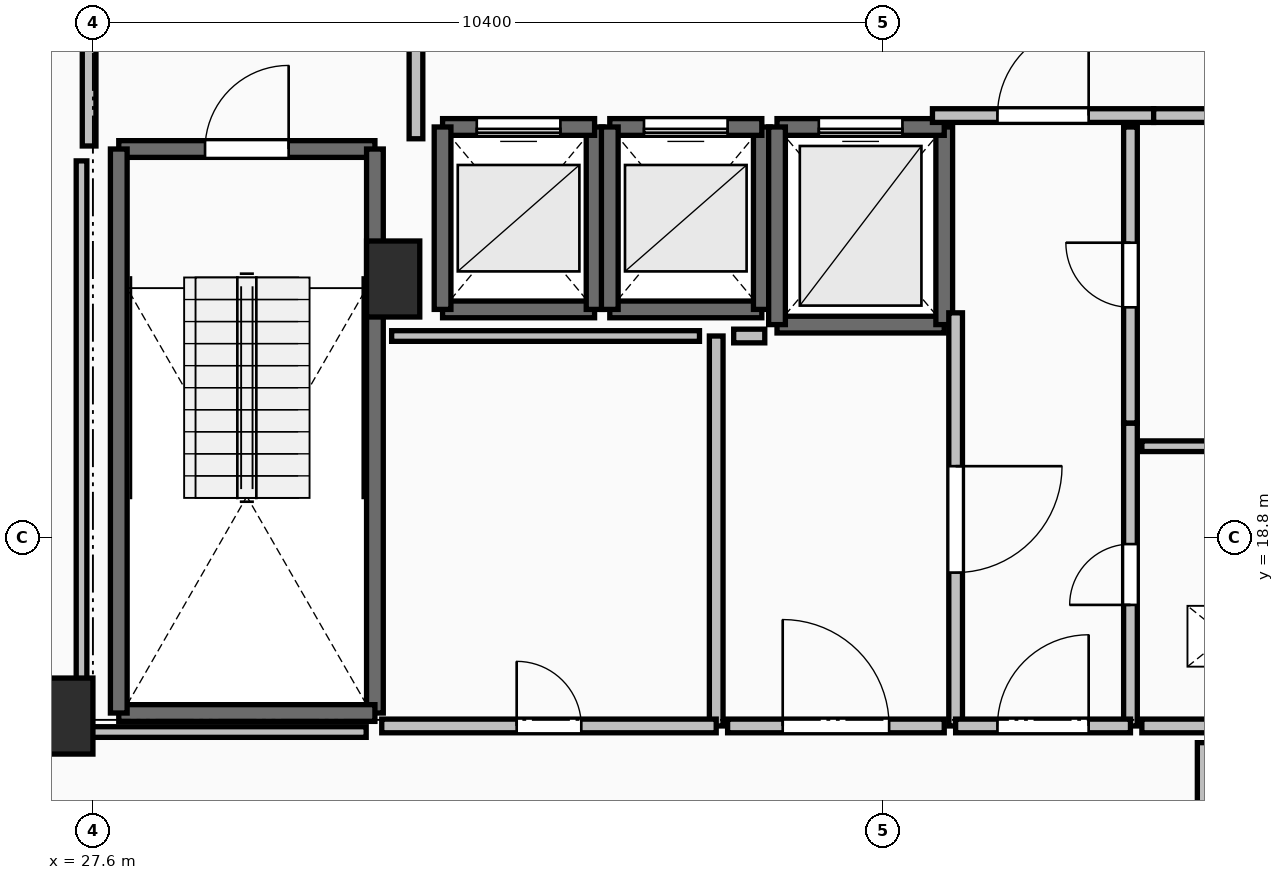
"""IFC4 building model, lengths in metres.
Left out: names, types, materials, properties, quantities, classifications, styles, units other than length and angle.
Written with IfcOpenShell. Run it as: python <this file> out.ifc"""

import sys

from ifc_helpers import new_model, si_unit, direction, frame, frame_2d, origin, origin_2d, place, context, subcontext, project, spatial, rectangle, extrude, element, fill, save


model = new_model("IFC4")
c1 = context("Model", 3, precision=1e-05, world=origin(), true_north=direction((0.0, 1.0)))
c2 = subcontext(c1, "Body", "Model", "MODEL_VIEW")
j1 = project(units=[si_unit("LENGTHUNIT", "METRE"), si_unit("PLANEANGLEUNIT", "RADIAN")], contexts=[c1])
p1 = place(None, origin())
s1 = spatial("IfcSite", under=j1, at=p1, CompositionType="ELEMENT")
p2 = place(p1, origin())
s2 = spatial("IfcBuilding", under=s1, at=p2, CompositionType="ELEMENT")
p3 = place(p2, frame((0.0, 0.0, 221.4)))
s3 = spatial("IfcBuildingStorey", under=s2, at=p3, CompositionType="ELEMENT", Elevation=221.4)
for number, where, z_axis, x_axis in (
    (1, (27.25, 16.45, 0.0), (0.0, 0.0, 1.0), (1.0, 0.0, 0.0)),
    (2, (31.55, 22.2, 0.0), (0.0, 0.0, 1.0), (1.0, 0.0, 0.0)),
):
    element("IfcColumn", number, at=place(p3, frame(where, z_axis=z_axis, x_axis=x_axis)), inside=s3, PredefinedType="PILASTER", context=c2, shape_type="SweptSolid", body=[
        extrude(rectangle(XDim=0.7, YDim=1.0, at=origin_2d()), origin(), (0.0, 0.0, 1.0), 3.55),
    ])
p4 = place(p3, frame((27.94, 23.91, 0.0), z_axis=(0.0, 0.0, 1.0), x_axis=(1.0, 0.0, 0.0)))
e3 = element("IfcWall", 3, at=p4, inside=s3, PredefinedType="SOLIDWALL", context=c2, shape_type="SweptSolid", body=[
    extrude(rectangle(XDim=3.37, YDim=0.22, at=frame_2d((1.685, 0.0))), origin(), (0.0, 0.0, 1.0), 3.2),
])
p5 = place(p4, frame((1.135, 0.0, 0.0)))
e4 = element("IfcOpeningElement", 4, at=p5, cuts=e3, PredefinedType="OPENING", context=c2, shape_type="SweptSolid", body=[
    extrude(rectangle(XDim=1.1, YDim=2.15, at=frame_2d((0.55, 1.075))), frame((0.0, 0.125, 0.0), z_axis=(0.0, -1.0, 0.0), x_axis=(1.0, 0.0, 0.0)), (0.0, 0.0, 1.0), 0.25),
])
p6 = place(p3, frame((31.31, 23.91, 0.0), z_axis=(0.0, 0.0, 1.0), x_axis=(0.0, -1.0, 0.0)))
e5 = element("IfcWall", 5, at=p6, inside=s3, PredefinedType="SOLIDWALL", context=c2, shape_type="SweptSolid", body=[
    extrude(rectangle(XDim=7.42, YDim=0.22, at=frame_2d((3.71, 0.0))), origin(), (0.0, 0.0, 1.0), 3.2),
])
p7 = place(p3, frame((31.31, 16.49, 0.0), z_axis=(0.0, 0.0, 1.0), x_axis=(-1.0, 0.0, 0.0)))
e6 = element("IfcWall", 6, at=p7, inside=s3, PredefinedType="SOLIDWALL", context=c2, shape_type="SweptSolid", body=[
    extrude(rectangle(XDim=3.37, YDim=0.22, at=frame_2d((1.685, 0.0))), origin(), (0.0, 0.0, 1.0), 3.2),
])
p8 = place(p3, frame((27.94, 16.49, 0.0), z_axis=(0.0, 0.0, 1.0), x_axis=(0.0, 1.0, 0.0)))
e7 = element("IfcWall", 7, at=p8, inside=s3, PredefinedType="SOLIDWALL", context=c2, shape_type="SweptSolid", body=[
    extrude(rectangle(XDim=7.42, YDim=0.22, at=frame_2d((3.71, 0.0))), origin(), (0.0, 0.0, 1.0), 3.2),
])
p9 = place(p3, frame((32.2, 21.8, 0.0), z_axis=(0.0, 0.0, 1.0), x_axis=(1.0, 0.0, 0.0)))
e8 = element("IfcWall", 8, at=p9, inside=s3, PredefinedType="SOLIDWALL", context=c2, shape_type="SweptSolid", body=[
    extrude(rectangle(XDim=2.0, YDim=0.22, at=frame_2d((1.0, 0.0))), origin(), (0.0, 0.0, 1.0), 3.2),
])
p10 = place(p3, frame((34.2, 21.8, 0.0), z_axis=(0.0, 0.0, 1.0), x_axis=(0.0, 1.0, 0.0)))
e9 = element("IfcWall", 9, at=p10, inside=s3, PredefinedType="SOLIDWALL", context=c2, shape_type="SweptSolid", body=[
    extrude(rectangle(XDim=2.4, YDim=0.22, at=frame_2d((1.2, 0.0))), origin(), (0.0, 0.0, 1.0), 3.2),
])
p11 = place(p3, frame((34.2, 24.2, 0.0), z_axis=(0.0, 0.0, 1.0), x_axis=(-1.0, 0.0, 0.0)))
e10 = element("IfcWall", 10, at=p11, inside=s3, PredefinedType="SOLIDWALL", context=c2, shape_type="SweptSolid", body=[
    extrude(rectangle(XDim=2.0, YDim=0.22, at=frame_2d((1.0, 0.0))), origin(), (0.0, 0.0, 1.0), 3.2),
])
p12 = place(p11, frame((0.45, 0.0, 0.0)))
e11 = element("IfcOpeningElement", 11, at=p12, cuts=e10, PredefinedType="OPENING", context=c2, shape_type="SweptSolid", body=[
    extrude(rectangle(XDim=1.1, YDim=2.2, at=frame_2d((0.55, 1.1))), frame((0.0, 0.125, 0.0), z_axis=(0.0, -1.0, 0.0), x_axis=(1.0, 0.0, 0.0)), (0.0, 0.0, 1.0), 0.25),
])
p13 = place(p3, frame((32.2, 24.2, 0.0), z_axis=(0.0, 0.0, 1.0), x_axis=(0.0, -1.0, 0.0)))
e12 = element("IfcWall", 12, at=p13, inside=s3, PredefinedType="SOLIDWALL", context=c2, shape_type="SweptSolid", body=[
    extrude(rectangle(XDim=2.4, YDim=0.22, at=frame_2d((1.2, 0.0))), origin(), (0.0, 0.0, 1.0), 3.2),
])
p14 = place(p3, frame((34.4, 21.8, 0.0), z_axis=(0.0, 0.0, 1.0), x_axis=(1.0, 0.0, 0.0)))
e13 = element("IfcWall", 13, at=p14, inside=s3, PredefinedType="SOLIDWALL", context=c2, shape_type="SweptSolid", body=[
    extrude(rectangle(XDim=2.0, YDim=0.22, at=frame_2d((1.0, 0.0))), origin(), (0.0, 0.0, 1.0), 3.2),
])
p15 = place(p3, frame((36.4, 21.8, 0.0), z_axis=(0.0, 0.0, 1.0), x_axis=(0.0, 1.0, 0.0)))
e14 = element("IfcWall", 14, at=p15, inside=s3, PredefinedType="SOLIDWALL", context=c2, shape_type="SweptSolid", body=[
    extrude(rectangle(XDim=2.4, YDim=0.22, at=frame_2d((1.2, 0.0))), origin(), (0.0, 0.0, 1.0), 3.2),
])
p16 = place(p3, frame((36.4, 24.2, 0.0), z_axis=(0.0, 0.0, 1.0), x_axis=(-1.0, 0.0, 0.0)))
e15 = element("IfcWall", 15, at=p16, inside=s3, PredefinedType="SOLIDWALL", context=c2, shape_type="SweptSolid", body=[
    extrude(rectangle(XDim=2.0, YDim=0.22, at=frame_2d((1.0, 0.0))), origin(), (0.0, 0.0, 1.0), 3.2),
])
p17 = place(p16, frame((0.45, 0.0, 0.0)))
e16 = element("IfcOpeningElement", 16, at=p17, cuts=e15, PredefinedType="OPENING", context=c2, shape_type="SweptSolid", body=[
    extrude(rectangle(XDim=1.1, YDim=2.2, at=frame_2d((0.55, 1.1))), frame((0.0, 0.125, 0.0), z_axis=(0.0, -1.0, 0.0), x_axis=(1.0, 0.0, 0.0)), (0.0, 0.0, 1.0), 0.25),
])
p18 = place(p3, frame((34.4, 24.2, 0.0), z_axis=(0.0, 0.0, 1.0), x_axis=(0.0, -1.0, 0.0)))
e17 = element("IfcWall", 17, at=p18, inside=s3, PredefinedType="SOLIDWALL", context=c2, shape_type="SweptSolid", body=[
    extrude(rectangle(XDim=2.4, YDim=0.22, at=frame_2d((1.2, 0.0))), origin(), (0.0, 0.0, 1.0), 3.2),
])
p19 = place(p3, frame((36.6, 21.6, 0.0), z_axis=(0.0, 0.0, 1.0), x_axis=(1.0, 0.0, 0.0)))
e18 = element("IfcWall", 18, at=p19, inside=s3, PredefinedType="SOLIDWALL", context=c2, shape_type="SweptSolid", body=[
    extrude(rectangle(XDim=2.2, YDim=0.22, at=frame_2d((1.1, 0.0))), origin(), (0.0, 0.0, 1.0), 3.2),
])
p20 = place(p3, frame((38.8, 21.6, 0.0), z_axis=(0.0, 0.0, 1.0), x_axis=(0.0, 1.0, 0.0)))
e19 = element("IfcWall", 19, at=p20, inside=s3, PredefinedType="SOLIDWALL", context=c2, shape_type="SweptSolid", body=[
    extrude(rectangle(XDim=2.6, YDim=0.22, at=frame_2d((1.3, 0.0))), origin(), (0.0, 0.0, 1.0), 3.2),
])
p21 = place(p3, frame((38.8, 24.2, 0.0), z_axis=(0.0, 0.0, 1.0), x_axis=(-1.0, 0.0, 0.0)))
e20 = element("IfcWall", 20, at=p21, inside=s3, PredefinedType="SOLIDWALL", context=c2, shape_type="SweptSolid", body=[
    extrude(rectangle(XDim=2.2, YDim=0.22, at=frame_2d((1.1, 0.0))), origin(), (0.0, 0.0, 1.0), 3.2),
])
p22 = place(p21, frame((0.55, 0.0, 0.0)))
e21 = element("IfcOpeningElement", 21, at=p22, cuts=e20, PredefinedType="OPENING", context=c2, shape_type="SweptSolid", body=[
    extrude(rectangle(XDim=1.1, YDim=2.2, at=frame_2d((0.55, 1.1))), frame((0.0, 0.125, 0.0), z_axis=(0.0, -1.0, 0.0), x_axis=(1.0, 0.0, 0.0)), (0.0, 0.0, 1.0), 0.25),
])
p23 = place(p3, frame((36.6, 24.2, 0.0), z_axis=(0.0, 0.0, 1.0), x_axis=(0.0, -1.0, 0.0)))
e22 = element("IfcWall", 22, at=p23, inside=s3, PredefinedType="SOLIDWALL", context=c2, shape_type="SweptSolid", body=[
    extrude(rectangle(XDim=2.6, YDim=0.22, at=frame_2d((1.3, 0.0))), origin(), (0.0, 0.0, 1.0), 3.2),
])
p24 = place(p3, frame((31.85, 24.045, 0.0), z_axis=(0.0, 0.0, 1.0), x_axis=(0.0, 1.0, 0.0)))
e23 = element("IfcWall", 23, at=p24, inside=s3, PredefinedType="PARTITIONING", context=c2, shape_type="SweptSolid", body=[
    extrude(rectangle(XDim=3.91, YDim=0.18, at=frame_2d((1.955, 0.0))), origin(), (0.0, 0.0, 1.0), 3.2),
])
p25 = place(p24, frame((1.355, 0.0, 0.0)))
e24 = element("IfcOpeningElement", 24, at=p25, cuts=e23, PredefinedType="OPENING", context=c2, shape_type="SweptSolid", body=[
    extrude(rectangle(XDim=1.2, YDim=2.15, at=frame_2d((0.6, 1.075))), frame((0.0, 0.105, 0.0), z_axis=(0.0, -1.0, 0.0), x_axis=(1.0, 0.0, 0.0)), (0.0, 0.0, 1.0), 0.21),
])
p26 = place(p3, frame((27.55, 28.0, 0.0), z_axis=(0.0, 0.0, 1.0), x_axis=(0.0, -1.0, 0.0)))
e25 = element("IfcWall", 25, at=p26, inside=s3, PredefinedType="PARTITIONING", context=c2, shape_type="SweptSolid", body=[
    extrude(rectangle(XDim=4.05, YDim=0.18, at=frame_2d((2.025, 0.0))), origin(), (0.0, 0.0, 1.0), 3.2),
])
p27 = place(p26, frame((1.425, 0.0, 0.0)))
e26 = element("IfcOpeningElement", 26, at=p27, cuts=e25, PredefinedType="OPENING", context=c2, shape_type="SweptSolid", body=[
    extrude(rectangle(XDim=1.2, YDim=2.15, at=frame_2d((0.6, 1.075))), frame((0.0, 0.105, 0.0), z_axis=(0.0, -1.0, 0.0), x_axis=(1.0, 0.0, 0.0)), (0.0, 0.0, 1.0), 0.21),
])
p28 = place(p3, frame((38.645, 24.35, 0.0), z_axis=(0.0, 0.0, 1.0), x_axis=(1.0, 0.0, 0.0)))
e27 = element("IfcWall", 27, at=p28, inside=s3, PredefinedType="PARTITIONING", context=c2, shape_type="SweptSolid", body=[
    extrude(rectangle(XDim=2.91, YDim=0.18, at=frame_2d((1.455, 0.0))), origin(), (0.0, 0.0, 1.0), 3.2),
])
p29 = place(p28, frame((0.855, 0.0, 0.0)))
e28 = element("IfcOpeningElement", 28, at=p29, cuts=e27, PredefinedType="OPENING", context=c2, shape_type="SweptSolid", body=[
    extrude(rectangle(XDim=1.2, YDim=2.15, at=frame_2d((0.6, 1.075))), frame((0.0, 0.105, 0.0), z_axis=(0.0, -1.0, 0.0), x_axis=(1.0, 0.0, 0.0)), (0.0, 0.0, 1.0), 0.21),
])
p30 = place(p3, frame((41.555, 24.35, 0.0), z_axis=(0.0, 0.0, 1.0), x_axis=(1.0, 0.0, 0.0)))
e29 = element("IfcWall", 29, at=p30, inside=s3, PredefinedType="PARTITIONING", context=c2, shape_type="SweptSolid", body=[
    extrude(rectangle(XDim=2.445, YDim=0.18, at=frame_2d((1.223, 0.0))), origin(), (0.0, 0.0, 1.0), 3.2),
])
p31 = place(p30, frame((0.798, 0.0, 0.0)))
e30 = element("IfcOpeningElement", 30, at=p31, cuts=e29, PredefinedType="OPENING", context=c2, shape_type="SweptSolid", body=[
    extrude(rectangle(XDim=0.85, YDim=2.1, at=frame_2d((0.425, 1.05))), frame((0.0, 0.105, 0.0), z_axis=(0.0, -1.0, 0.0), x_axis=(1.0, 0.0, 0.0)), (0.0, 0.0, 1.0), 0.21),
])
p32 = place(p3, frame((41.25, 16.32, 0.0), z_axis=(0.0, 0.0, 1.0), x_axis=(0.0, 1.0, 0.0)))
e31 = element("IfcWall", 31, at=p32, inside=s3, PredefinedType="PARTITIONING", context=c2, shape_type="SweptSolid", body=[
    extrude(rectangle(XDim=3.985, YDim=0.18, at=frame_2d((1.992, 0.0))), origin(), (0.0, 0.0, 1.0), 3.2),
])
p33 = place(p32, frame((1.593, 0.0, 0.0)))
e32 = element("IfcOpeningElement", 32, at=p33, cuts=e31, PredefinedType="OPENING", context=c2, shape_type="SweptSolid", body=[
    extrude(rectangle(XDim=0.8, YDim=2.05, at=frame_2d((0.4, 1.025))), frame((0.0, 0.105, 0.0), z_axis=(0.0, -1.0, 0.0), x_axis=(1.0, 0.0, 0.0)), (0.0, 0.0, 1.0), 0.21),
])
p34 = place(p3, frame((41.25, 20.305, 0.0), z_axis=(0.0, 0.0, 1.0), x_axis=(0.0, 1.0, 0.0)))
e33 = element("IfcWall", 33, at=p34, inside=s3, PredefinedType="PARTITIONING", context=c2, shape_type="SweptSolid", body=[
    extrude(rectangle(XDim=3.895, YDim=0.18, at=frame_2d((1.948, 0.0))), origin(), (0.0, 0.0, 1.0), 3.2),
])
p35 = place(p34, frame((1.522, 0.0, 0.0)))
e34 = element("IfcOpeningElement", 34, at=p35, cuts=e33, PredefinedType="OPENING", context=c2, shape_type="SweptSolid", body=[
    extrude(rectangle(XDim=0.85, YDim=2.1, at=frame_2d((0.425, 1.05))), frame((0.0, 0.105, 0.0), z_axis=(0.0, -1.0, 0.0), x_axis=(1.0, 0.0, 0.0)), (0.0, 0.0, 1.0), 0.21),
])
p36 = place(p3, frame((38.95, 21.755, 0.0), z_axis=(0.0, 0.0, 1.0), x_axis=(0.0, -1.0, 0.0)))
e35 = element("IfcWall", 35, at=p36, inside=s3, PredefinedType="PARTITIONING", context=c2, shape_type="SweptSolid", body=[
    extrude(rectangle(XDim=5.435, YDim=0.18, at=frame_2d((2.717, 0.0))), origin(), (0.0, 0.0, 1.0), 3.2),
])
p37 = place(p36, frame((2.018, 0.0, 0.0)))
e36 = element("IfcOpeningElement", 36, at=p37, cuts=e35, PredefinedType="OPENING", context=c2, shape_type="SweptSolid", body=[
    extrude(rectangle(XDim=1.4, YDim=2.2, at=frame_2d((0.7, 1.1))), frame((0.0, 0.105, 0.0), z_axis=(0.0, -1.0, 0.0), x_axis=(1.0, 0.0, 0.0)), (0.0, 0.0, 1.0), 0.21),
])
p38 = place(p3, frame((38.95, 16.32, 0.0), z_axis=(0.0, 0.0, 1.0), x_axis=(1.0, 0.0, 0.0)))
e37 = element("IfcWall", 37, at=p38, inside=s3, PredefinedType="PARTITIONING", context=c2, shape_type="SweptSolid", body=[
    extrude(rectangle(XDim=2.3, YDim=0.18, at=frame_2d((1.15, 0.0))), origin(), (0.0, 0.0, 1.0), 3.2),
])
p39 = place(p38, frame((0.55, 0.0, 0.0)))
e38 = element("IfcOpeningElement", 38, at=p39, cuts=e37, PredefinedType="OPENING", context=c2, shape_type="SweptSolid", body=[
    extrude(rectangle(XDim=1.2, YDim=2.15, at=frame_2d((0.6, 1.075))), frame((0.0, 0.105, 0.0), z_axis=(0.0, -1.0, 0.0), x_axis=(1.0, 0.0, 0.0)), (0.0, 0.0, 1.0), 0.21),
])
p40 = place(p3, frame((44.6, 20.0, 0.0), z_axis=(0.0, 0.0, 1.0), x_axis=(-1.0, 0.0, 0.0)))
e39 = element("IfcWall", 39, at=p40, inside=s3, PredefinedType="PARTITIONING", context=c2, shape_type="SweptSolid", body=[
    extrude(rectangle(XDim=3.2, YDim=0.14, at=frame_2d((1.6, 0.0))), origin(), (0.0, 0.0, 1.0), 3.2),
])
p41 = place(p3, frame((41.4, 16.32, 0.0), z_axis=(0.0, 0.0, 1.0), x_axis=(1.0, 0.0, 0.0)))
e40 = element("IfcWall", 40, at=p41, inside=s3, PredefinedType="PARTITIONING", context=c2, shape_type="SweptSolid", body=[
    extrude(rectangle(XDim=3.2, YDim=0.18, at=frame_2d((1.6, 0.0))), origin(), (0.0, 0.0, 1.0), 3.2),
])
p42 = place(p41, frame((1.2, 0.0, 0.0)))
e41 = element("IfcOpeningElement", 41, at=p42, cuts=e40, PredefinedType="OPENING", context=c2, shape_type="SweptSolid", body=[
    extrude(rectangle(XDim=0.8, YDim=2.05, at=frame_2d((0.4, 1.025))), frame((0.0, 0.105, 0.0), z_axis=(0.0, -1.0, 0.0), x_axis=(1.0, 0.0, 0.0)), (0.0, 0.0, 1.0), 0.21),
])
p43 = place(p3, frame((35.8, 16.32, 0.0), z_axis=(0.0, 0.0, 1.0), x_axis=(0.0, 1.0, 0.0)))
e42 = element("IfcWall", 42, at=p43, inside=s3, PredefinedType="PARTITIONING", context=c2, shape_type="SweptSolid", body=[
    extrude(rectangle(XDim=5.13, YDim=0.18, at=frame_2d((2.565, 0.0))), origin(), (0.0, 0.0, 1.0), 3.2),
])
p44 = place(p3, frame((31.4, 16.32, 0.0), z_axis=(0.0, 0.0, 1.0), x_axis=(1.0, 0.0, 0.0)))
e43 = element("IfcWall", 43, at=p44, inside=s3, PredefinedType="PARTITIONING", context=c2, shape_type="SweptSolid", body=[
    extrude(rectangle(XDim=4.4, YDim=0.18, at=frame_2d((2.2, 0.0))), origin(), (0.0, 0.0, 1.0), 3.2),
])
p45 = place(p44, frame((1.775, 0.0, 0.0)))
e44 = element("IfcOpeningElement", 44, at=p45, cuts=e43, PredefinedType="OPENING", context=c2, shape_type="SweptSolid", body=[
    extrude(rectangle(XDim=0.85, YDim=2.1, at=frame_2d((0.425, 1.05))), frame((0.0, 0.105, 0.0), z_axis=(0.0, -1.0, 0.0), x_axis=(1.0, 0.0, 0.0)), (0.0, 0.0, 1.0), 0.21),
])
p46 = place(p3, frame((35.95, 16.32, 0.0), z_axis=(0.0, 0.0, 1.0), x_axis=(1.0, 0.0, 0.0)))
e45 = element("IfcWall", 45, at=p46, inside=s3, PredefinedType="PARTITIONING", context=c2, shape_type="SweptSolid", body=[
    extrude(rectangle(XDim=2.85, YDim=0.18, at=frame_2d((1.425, 0.0))), origin(), (0.0, 0.0, 1.0), 3.2),
])
p47 = place(p46, frame((0.725, 0.0, 0.0)))
e46 = element("IfcOpeningElement", 46, at=p47, cuts=e45, PredefinedType="OPENING", context=c2, shape_type="SweptSolid", body=[
    extrude(rectangle(XDim=1.4, YDim=2.2, at=frame_2d((0.7, 1.1))), frame((0.0, 0.105, 0.0), z_axis=(0.0, -1.0, 0.0), x_axis=(1.0, 0.0, 0.0)), (0.0, 0.0, 1.0), 0.21),
])
p48 = place(p3, frame((35.58, 21.45, 0.0), z_axis=(0.0, 0.0, 1.0), x_axis=(-1.0, 0.0, 0.0)))
e47 = element("IfcWall", 47, at=p48, inside=s3, PredefinedType="PARTITIONING", context=c2, shape_type="SweptSolid", body=[
    extrude(rectangle(XDim=4.05, YDim=0.14, at=frame_2d((2.025, 0.0))), origin(), (0.0, 0.0, 1.0), 3.2),
])
p49 = place(p3, frame((36.439, 21.45, 0.0), z_axis=(0.0, 0.0, 1.0), x_axis=(-1.0, 0.0, 0.0)))
e48 = element("IfcWall", 48, at=p49, inside=s3, PredefinedType="PARTITIONING", context=c2, shape_type="SweptSolid", body=[
    extrude(rectangle(XDim=0.409, YDim=0.18, at=frame_2d((0.205, 0.0))), origin(), (0.0, 0.0, 1.0), 3.2),
])
p50 = place(p3, frame((27.45, 23.754, 0.0), z_axis=(0.0, 0.0, 1.0), x_axis=(0.0, -1.0, 0.0)))
e49 = element("IfcWall", 49, at=p50, inside=s3, PredefinedType="PARTITIONING", context=c2, shape_type="SweptSolid", body=[
    extrude(rectangle(XDim=7.514, YDim=0.14, at=frame_2d((3.757, 0.0))), origin(), (0.0, 0.0, 1.0), 2.392),
])
p51 = place(p3, frame((27.45, 16.24, 0.0), z_axis=(0.0, 0.0, 1.0), x_axis=(1.0, 0.0, 0.0)))
e50 = element("IfcWall", 50, at=p51, inside=s3, PredefinedType="PARTITIONING", context=c2, shape_type="SweptSolid", body=[
    extrude(rectangle(XDim=3.745, YDim=0.14, at=frame_2d((1.873, 0.0))), origin(), (0.0, 0.0, 1.0), 2.392),
])
p52 = place(p3, frame((42.2, 16.1, 0.0), z_axis=(0.0, 0.0, 1.0), x_axis=(0.0, -1.0, 0.0)))
e51 = element("IfcWall", 51, at=p52, inside=s3, PredefinedType="PARTITIONING", context=c2, shape_type="SweptSolid", body=[
    extrude(rectangle(XDim=1.83, YDim=0.14, at=frame_2d((0.915, 0.0))), origin(), (0.0, 0.0, 1.0), 3.2),
])
p53 = place(p5, origin())
e52 = element("IfcDoor", 52, at=p53, inside=s3, OperationType="SINGLE_SWING_RIGHT", PredefinedType="DOOR", context=c2, shape_type="SweptSolid", body=[
    extrude(rectangle(XDim=1.1, YDim=2.15, at=frame_2d((0.55, 1.075))), frame((0.0, 0.025, 0.0), z_axis=(0.0, -1.0, 0.0), x_axis=(1.0, 0.0, 0.0)), (0.0, 0.0, 1.0), 0.05),
])
fill(e4, e52)
p54 = place(p12, origin())
e53 = element("IfcDoor", 53, at=p54, inside=s3, OperationType="SLIDING_TO_LEFT", PredefinedType="DOOR", context=c2, shape_type="SweptSolid", body=[
    extrude(rectangle(XDim=1.1, YDim=2.2, at=frame_2d((0.55, 1.1))), frame((0.0, 0.025, 0.0), z_axis=(0.0, -1.0, 0.0), x_axis=(1.0, 0.0, 0.0)), (0.0, 0.0, 1.0), 0.05),
])
fill(e11, e53)
p55 = place(p17, origin())
e54 = element("IfcDoor", 54, at=p55, inside=s3, OperationType="SLIDING_TO_LEFT", PredefinedType="DOOR", context=c2, shape_type="SweptSolid", body=[
    extrude(rectangle(XDim=1.1, YDim=2.2, at=frame_2d((0.55, 1.1))), frame((0.0, 0.025, 0.0), z_axis=(0.0, -1.0, 0.0), x_axis=(1.0, 0.0, 0.0)), (0.0, 0.0, 1.0), 0.05),
])
fill(e16, e54)
p56 = place(p22, origin())
e55 = element("IfcDoor", 55, at=p56, inside=s3, OperationType="SLIDING_TO_LEFT", PredefinedType="DOOR", context=c2, shape_type="SweptSolid", body=[
    extrude(rectangle(XDim=1.1, YDim=2.2, at=frame_2d((0.55, 1.1))), frame((0.0, 0.025, 0.0), z_axis=(0.0, -1.0, 0.0), x_axis=(1.0, 0.0, 0.0)), (0.0, 0.0, 1.0), 0.05),
])
fill(e21, e55)
p57 = place(p29, origin())
e56 = element("IfcDoor", 56, at=p57, inside=s3, OperationType="SINGLE_SWING_RIGHT", PredefinedType="DOOR", context=c2, shape_type="SweptSolid", body=[
    extrude(rectangle(XDim=1.2, YDim=2.15, at=frame_2d((0.6, 1.075))), frame((0.0, 0.025, 0.0), z_axis=(0.0, -1.0, 0.0), x_axis=(1.0, 0.0, 0.0)), (0.0, 0.0, 1.0), 0.05),
])
fill(e28, e56)
p58 = place(p33, origin())
e57 = element("IfcDoor", 57, at=p58, inside=s3, OperationType="SINGLE_SWING_LEFT", PredefinedType="DOOR", context=c2, shape_type="SweptSolid", body=[
    extrude(rectangle(XDim=0.8, YDim=2.05, at=frame_2d((0.4, 1.025))), frame((0.0, 0.025, 0.0), z_axis=(0.0, -1.0, 0.0), x_axis=(1.0, 0.0, 0.0)), (0.0, 0.0, 1.0), 0.05),
])
fill(e32, e57)
p59 = place(p35, origin())
e58 = element("IfcDoor", 58, at=p59, inside=s3, OperationType="SINGLE_SWING_RIGHT", PredefinedType="DOOR", context=c2, shape_type="SweptSolid", body=[
    extrude(rectangle(XDim=0.85, YDim=2.1, at=frame_2d((0.425, 1.05))), frame((0.0, 0.025, 0.0), z_axis=(0.0, -1.0, 0.0), x_axis=(1.0, 0.0, 0.0)), (0.0, 0.0, 1.0), 0.05),
])
fill(e34, e58)
p60 = place(p37, origin())
e59 = element("IfcDoor", 59, at=p60, inside=s3, OperationType="DOUBLE_SWING_LEFT", PredefinedType="DOOR", context=c2, shape_type="SweptSolid", body=[
    extrude(rectangle(XDim=1.4, YDim=2.2, at=frame_2d((0.7, 1.1))), frame((0.0, 0.025, 0.0), z_axis=(0.0, -1.0, 0.0), x_axis=(1.0, 0.0, 0.0)), (0.0, 0.0, 1.0), 0.05),
])
fill(e36, e59)
p61 = place(p39, origin())
e60 = element("IfcDoor", 60, at=p61, inside=s3, OperationType="SINGLE_SWING_RIGHT", PredefinedType="DOOR", context=c2, shape_type="SweptSolid", body=[
    extrude(rectangle(XDim=1.2, YDim=2.15, at=frame_2d((0.6, 1.075))), frame((0.0, 0.025, 0.0), z_axis=(0.0, -1.0, 0.0), x_axis=(1.0, 0.0, 0.0)), (0.0, 0.0, 1.0), 0.05),
])
fill(e38, e60)
p62 = place(p45, origin())
e61 = element("IfcDoor", 61, at=p62, inside=s3, OperationType="SINGLE_SWING_LEFT", PredefinedType="DOOR", context=c2, shape_type="SweptSolid", body=[
    extrude(rectangle(XDim=0.85, YDim=2.1, at=frame_2d((0.425, 1.05))), frame((0.0, 0.025, 0.0), z_axis=(0.0, -1.0, 0.0), x_axis=(1.0, 0.0, 0.0)), (0.0, 0.0, 1.0), 0.05),
])
fill(e44, e61)
p63 = place(p47, origin())
e62 = element("IfcDoor", 62, at=p63, inside=s3, OperationType="DOUBLE_SWING_LEFT", PredefinedType="DOOR", context=c2, shape_type="SweptSolid", body=[
    extrude(rectangle(XDim=1.4, YDim=2.2, at=frame_2d((0.7, 1.1))), frame((0.0, 0.025, 0.0), z_axis=(0.0, -1.0, 0.0), x_axis=(1.0, 0.0, 0.0)), (0.0, 0.0, 1.0), 0.05),
])
fill(e46, e62)
save(model, sys.argv[1])
